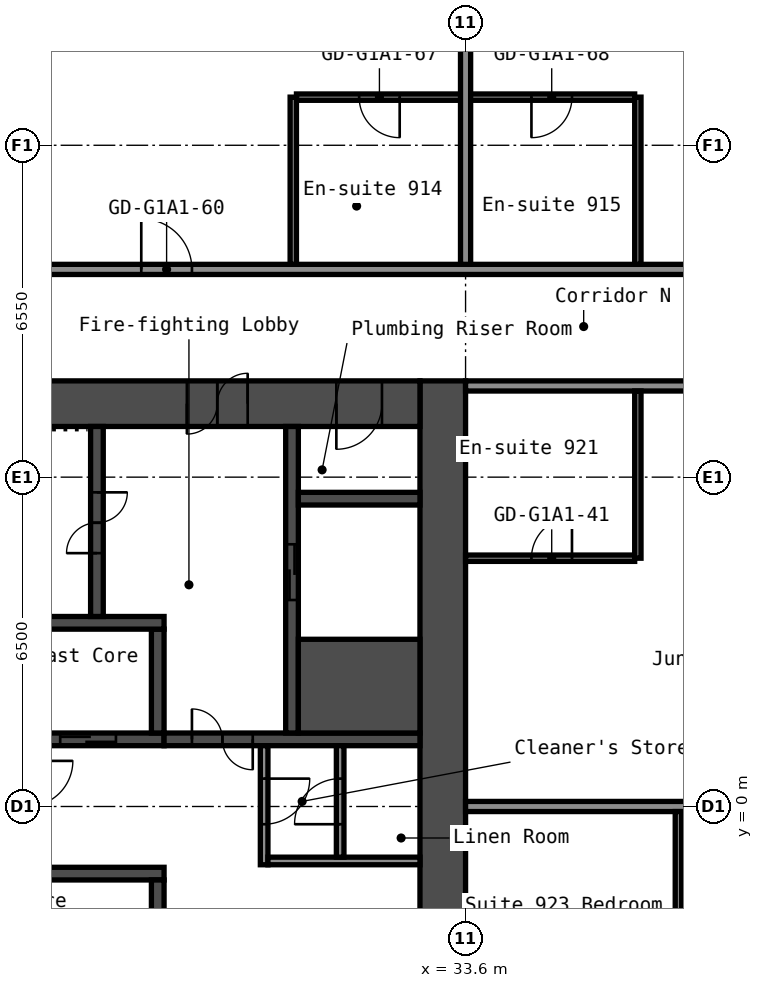
"""IFC4 building model, lengths in metres.
Left out: names, types, materials, properties, quantities, classifications, styles, units other than length and angle.
Written with IfcOpenShell. Run it as: python <this file> out.ifc"""

import sys

from ifc_helpers import new_model, si_unit, direction, frame, frame_2d, origin, place, context, subcontext, project, spatial, rectangle, extrude, element, fill, save


model = new_model("IFC4")
c1 = context("Model", 3, precision=1e-05, world=origin(), true_north=direction((0.0, 1.0)))
c2 = subcontext(c1, "Body", "Model", "MODEL_VIEW")
j1 = project(units=[si_unit("LENGTHUNIT", "METRE"), si_unit("PLANEANGLEUNIT", "RADIAN")], contexts=[c1])
p1 = place(None, origin())
s1 = spatial("IfcSite", under=j1, at=p1, CompositionType="ELEMENT")
p2 = place(p1, origin())
s2 = spatial("IfcBuilding", under=s1, at=p2, CompositionType="ELEMENT")
p3 = place(p2, frame((0.0, 0.0, 35.8)))
s3 = spatial("IfcBuildingStorey", under=s2, at=p3, CompositionType="ELEMENT", Elevation=35.8)
p4 = place(p3, frame((33.15, -8.4, 0.0), z_axis=(0.0, 0.0, 1.0), x_axis=(0.0, 1.0, 0.0)))
e1 = element("IfcWall", 1, at=p4, inside=s3, PredefinedType="SHEAR", context=c2, shape_type="SweptSolid", body=[
    extrude(rectangle(XDim=16.8, YDim=0.9, at=frame_2d((8.4, 0.0))), origin(), (0.0, 0.0, 1.0), 2.8),
])
p5 = place(p3, frame((17.7, 7.95, 0.0), z_axis=(0.0, 0.0, 1.0), x_axis=(1.0, 0.0, 0.0)))
e2 = element("IfcWall", 2, at=p5, inside=s3, PredefinedType="SHEAR", context=c2, shape_type="SweptSolid", body=[
    extrude(rectangle(XDim=15.0, YDim=0.9, at=frame_2d((7.5, 0.0))), origin(), (0.0, 0.0, 1.0), 2.8),
])
p6 = place(p5, frame((10.4, 0.0, 0.0)))
e3 = element("IfcOpeningElement", 3, at=p6, cuts=e2, PredefinedType="OPENING", context=c2, shape_type="SweptSolid", body=[
    extrude(rectangle(XDim=1.2, YDim=2.1, at=frame_2d((0.6, 1.05))), frame((0.0, 0.46, 0.0), z_axis=(0.0, -1.0, 0.0), x_axis=(1.0, 0.0, 0.0)), (0.0, 0.0, 1.0), 0.92),
])
p7 = place(p5, frame((13.35, 0.0, 0.0)))
e4 = element("IfcOpeningElement", 4, at=p7, cuts=e2, PredefinedType="OPENING", context=c2, shape_type="SweptSolid", body=[
    extrude(rectangle(XDim=0.9, YDim=2.1, at=frame_2d((0.45, 1.05))), frame((0.0, 0.46, 0.0), z_axis=(0.0, -1.0, 0.0), x_axis=(1.0, 0.0, 0.0)), (0.0, 0.0, 1.0), 0.92),
])
p8 = place(p3, frame((20.15, 1.325, 0.0), z_axis=(0.0, 0.0, 1.0), x_axis=(1.0, 0.0, 0.0)))
e5 = element("IfcWall", 5, at=p8, inside=s3, PredefinedType="SHEAR", context=c2, shape_type="SweptSolid", body=[
    extrude(rectangle(XDim=7.5, YDim=0.25, at=frame_2d((3.75, 0.0))), origin(), (0.0, 0.0, 1.0), 2.8),
])
p9 = place(p8, frame((0.65, 0.0, 0.0)))
e6 = element("IfcOpeningElement", 6, at=p9, cuts=e5, PredefinedType="OPENING", context=c2, shape_type="SweptSolid", body=[
    extrude(rectangle(XDim=1.1, YDim=2.1, at=frame_2d((0.55, 1.05))), frame((0.0, 0.135, 0.0), z_axis=(0.0, -1.0, 0.0), x_axis=(1.0, 0.0, 0.0)), (0.0, 0.0, 1.0), 0.27),
])
p10 = place(p8, frame((3.05, 0.0, 0.0)))
e7 = element("IfcOpeningElement", 7, at=p10, cuts=e5, PredefinedType="OPENING", context=c2, shape_type="SweptSolid", body=[
    extrude(rectangle(XDim=1.1, YDim=2.1, at=frame_2d((0.55, 1.05))), frame((0.0, 0.135, 0.0), z_axis=(0.0, -1.0, 0.0), x_axis=(1.0, 0.0, 0.0)), (0.0, 0.0, 1.0), 0.27),
])
p11 = place(p8, frame((5.45, 0.0, 0.0)))
e8 = element("IfcOpeningElement", 8, at=p11, cuts=e5, PredefinedType="OPENING", context=c2, shape_type="SweptSolid", body=[
    extrude(rectangle(XDim=1.1, YDim=2.1, at=frame_2d((0.55, 1.05))), frame((0.0, 0.135, 0.0), z_axis=(0.0, -1.0, 0.0), x_axis=(1.0, 0.0, 0.0)), (0.0, 0.0, 1.0), 0.27),
])
p12 = place(p3, frame((27.525, 1.45, 0.0), z_axis=(0.0, 0.0, 1.0), x_axis=(0.0, 1.0, 0.0)))
e9 = element("IfcWall", 9, at=p12, inside=s3, PredefinedType="SHEAR", context=c2, shape_type="SweptSolid", body=[
    extrude(rectangle(XDim=2.05, YDim=0.25, at=frame_2d((1.025, 0.0))), origin(), (0.0, 0.0, 1.0), 2.8),
])
p13 = place(p3, frame((20.15, 3.625, 0.0), z_axis=(0.0, 0.0, 1.0), x_axis=(1.0, 0.0, 0.0)))
e10 = element("IfcWall", 10, at=p13, inside=s3, PredefinedType="SHEAR", context=c2, shape_type="SweptSolid", body=[
    extrude(rectangle(XDim=7.5, YDim=0.25, at=frame_2d((3.75, 0.0))), origin(), (0.0, 0.0, 1.0), 2.8),
])
p14 = place(p3, frame((26.325, 3.75, 0.0), z_axis=(0.0, 0.0, 1.0), x_axis=(0.0, 1.0, 0.0)))
e11 = element("IfcWall", 11, at=p14, inside=s3, PredefinedType="SHEAR", context=c2, shape_type="SweptSolid", body=[
    extrude(rectangle(XDim=3.75, YDim=0.25, at=frame_2d((1.875, 0.0))), origin(), (0.0, 0.0, 1.0), 2.8),
])
p15 = place(p14, frame((1.25, 0.0, 0.0)))
e12 = element("IfcOpeningElement", 12, at=p15, cuts=e11, PredefinedType="OPENING", context=c2, shape_type="SweptSolid", body=[
    extrude(rectangle(XDim=1.2, YDim=2.1, at=frame_2d((0.6, 1.05))), frame((0.0, 0.135, 0.0), z_axis=(0.0, -1.0, 0.0), x_axis=(1.0, 0.0, 0.0)), (0.0, 0.0, 1.0), 0.27),
])
p16 = place(p3, frame((27.65, 1.325, 0.0), z_axis=(0.0, 0.0, 1.0), x_axis=(1.0, 0.0, 0.0)))
e13 = element("IfcWall", 13, at=p16, inside=s3, PredefinedType="SHEAR", context=c2, shape_type="SweptSolid", body=[
    extrude(rectangle(XDim=5.05, YDim=0.25, at=frame_2d((2.525, 0.0))), origin(), (0.0, 0.0, 1.0), 2.8),
])
p17 = place(p16, frame((0.55, 0.0, 0.0)))
e14 = element("IfcOpeningElement", 14, at=p17, cuts=e13, PredefinedType="OPENING", context=c2, shape_type="SweptSolid", body=[
    extrude(rectangle(XDim=1.2, YDim=2.1, at=frame_2d((0.6, 1.05))), frame((0.0, 0.135, 0.0), z_axis=(0.0, -1.0, 0.0), x_axis=(1.0, 0.0, 0.0)), (0.0, 0.0, 1.0), 0.27),
])
p18 = place(p3, frame((30.175, 1.45, 0.0), z_axis=(0.0, 0.0, 1.0), x_axis=(0.0, 1.0, 0.0)))
e15 = element("IfcWall", 15, at=p18, inside=s3, PredefinedType="SHEAR", context=c2, shape_type="SweptSolid", body=[
    extrude(rectangle(XDim=6.05, YDim=0.25, at=frame_2d((3.025, 0.0))), origin(), (0.0, 0.0, 1.0), 2.8),
])
p19 = place(p18, frame((2.625, 0.0, 0.0)))
e16 = element("IfcOpeningElement", 16, at=p19, cuts=e15, PredefinedType="OPENING", context=c2, shape_type="SweptSolid", body=[
    extrude(rectangle(XDim=1.1, YDim=2.1, at=frame_2d((0.55, 1.05))), frame((0.0, 0.135, 0.0), z_axis=(0.0, -1.0, 0.0), x_axis=(1.0, 0.0, 0.0)), (0.0, 0.0, 1.0), 0.27),
])
p20 = place(p3, frame((30.3, 2.375, 0.0), z_axis=(0.0, 0.0, 1.0), x_axis=(1.0, 0.0, 0.0)))
e17 = element("IfcWall", 17, at=p20, inside=s3, PredefinedType="SHEAR", context=c2, shape_type="SweptSolid", body=[
    extrude(rectangle(XDim=2.4, YDim=1.85, at=frame_2d((1.2, 0.0))), origin(), (0.0, 0.0, 1.0), 2.8),
])
p21 = place(p3, frame((30.3, 6.075, 0.0), z_axis=(0.0, 0.0, 1.0), x_axis=(1.0, 0.0, 0.0)))
e18 = element("IfcWall", 18, at=p21, inside=s3, PredefinedType="SHEAR", context=c2, shape_type="SweptSolid", body=[
    extrude(rectangle(XDim=2.4, YDim=0.25, at=frame_2d((1.2, 0.0))), origin(), (0.0, 0.0, 1.0), 2.8),
])
p22 = place(p3, frame((20.15, -1.325, 0.0), z_axis=(0.0, 0.0, 1.0), x_axis=(1.0, 0.0, 0.0)))
e19 = element("IfcWall", 19, at=p22, inside=s3, PredefinedType="SHEAR", context=c2, shape_type="SweptSolid", body=[
    extrude(rectangle(XDim=7.5, YDim=0.25, at=frame_2d((3.75, 0.0))), origin(), (0.0, 0.0, 1.0), 2.8),
])
p23 = place(p3, frame((27.525, -3.5, 0.0), z_axis=(0.0, 0.0, 1.0), x_axis=(0.0, 1.0, 0.0)))
e20 = element("IfcWall", 20, at=p23, inside=s3, PredefinedType="SHEAR", context=c2, shape_type="SweptSolid", body=[
    extrude(rectangle(XDim=2.05, YDim=0.25, at=frame_2d((1.025, 0.0))), origin(), (0.0, 0.0, 1.0), 2.8),
])
p24 = place(p3, frame((29.625, -1.15, 0.0), z_axis=(0.0, 0.0, 1.0), x_axis=(0.0, 1.0, 0.0)))
e21 = element("IfcWall", 21, at=p24, inside=s3, PredefinedType="PARTITIONING", context=c2, shape_type="SweptSolid", body=[
    extrude(rectangle(XDim=2.35, YDim=0.15, at=frame_2d((1.175, 0.0))), origin(), (0.0, 0.0, 1.0), 2.8),
])
p25 = place(p24, frame((0.8, 0.0, 0.0)))
e22 = element("IfcOpeningElement", 22, at=p25, cuts=e21, PredefinedType="OPENING", context=c2, shape_type="SweptSolid", body=[
    extrude(rectangle(XDim=0.9, YDim=2.1, at=frame_2d((0.45, 1.05))), frame((0.0, 0.085, 0.0), z_axis=(0.0, -1.0, 0.0), x_axis=(1.0, 0.0, 0.0)), (0.0, 0.0, 1.0), 0.17),
])
p26 = place(p3, frame((29.7, -1.075, 0.0), z_axis=(0.0, 0.0, 1.0), x_axis=(1.0, 0.0, 0.0)))
e23 = element("IfcWall", 23, at=p26, inside=s3, PredefinedType="PARTITIONING", context=c2, shape_type="SweptSolid", body=[
    extrude(rectangle(XDim=3.0, YDim=0.15, at=frame_2d((1.5, 0.0))), origin(), (0.0, 0.0, 1.0), 2.8),
])
p27 = place(p3, frame((31.125, -1.0, 0.0), z_axis=(0.0, 0.0, 1.0), x_axis=(0.0, 1.0, 0.0)))
e24 = element("IfcWall", 24, at=p27, inside=s3, PredefinedType="PARTITIONING", context=c2, shape_type="SweptSolid", body=[
    extrude(rectangle(XDim=2.2, YDim=0.15, at=frame_2d((1.1, 0.0))), origin(), (0.0, 0.0, 1.0), 2.8),
])
p28 = place(p27, frame((0.65, 0.0, 0.0)))
e25 = element("IfcOpeningElement", 25, at=p28, cuts=e24, PredefinedType="OPENING", context=c2, shape_type="SweptSolid", body=[
    extrude(rectangle(XDim=0.9, YDim=2.1, at=frame_2d((0.45, 1.05))), frame((0.0, 0.085, 0.0), z_axis=(0.0, -1.0, 0.0), x_axis=(1.0, 0.0, 0.0)), (0.0, 0.0, 1.0), 0.17),
])
p29 = place(p3, frame((33.6, 0.0, 0.0), z_axis=(0.0, 0.0, 1.0), x_axis=(1.0, 0.0, 0.0)))
e26 = element("IfcWall", 26, at=p29, inside=s3, PredefinedType="PARTITIONING", context=c2, shape_type="SweptSolid", body=[
    extrude(rectangle(XDim=14.9, YDim=0.2, at=frame_2d((7.45, 0.0))), origin(), (0.0, 0.0, 1.0), 2.8),
])
p30 = place(p3, frame((33.6, 4.9, 0.0), z_axis=(0.0, 0.0, 1.0), x_axis=(1.0, 0.0, 0.0)))
e27 = element("IfcWall", 27, at=p30, inside=s3, PredefinedType="PARTITIONING", context=c2, shape_type="SweptSolid", body=[
    extrude(rectangle(XDim=3.337, YDim=0.125, at=frame_2d((1.669, 0.0))), origin(), (0.0, 0.0, 1.0), 2.8),
])
p31 = place(p30, frame((1.3, 0.0, 0.0)))
e28 = element("IfcOpeningElement", 28, at=p31, cuts=e27, PredefinedType="OPENING", context=c2, shape_type="SweptSolid", body=[
    extrude(rectangle(XDim=0.8, YDim=2.1, at=frame_2d((0.4, 1.05))), frame((0.0, 0.073, 0.0), z_axis=(0.0, -1.0, 0.0), x_axis=(1.0, 0.0, 0.0)), (0.0, 0.0, 1.0), 0.145),
])
p32 = place(p3, frame((33.6, 8.3, 0.0), z_axis=(0.0, 0.0, 1.0), x_axis=(1.0, 0.0, 0.0)))
e29 = element("IfcWall", 29, at=p32, inside=s3, PredefinedType="PARTITIONING", context=c2, shape_type="SweptSolid", body=[
    extrude(rectangle(XDim=15.0, YDim=0.2, at=frame_2d((7.5, 0.0))), origin(), (0.0, 0.0, 1.0), 2.8),
])
p33 = place(p32, frame((5.4, 0.0, 0.0)))
e30 = element("IfcOpeningElement", 30, at=p33, cuts=e29, PredefinedType="OPENING", context=c2, shape_type="SweptSolid", body=[
    extrude(rectangle(XDim=1.0, YDim=2.1, at=frame_2d((0.5, 1.05))), frame((0.0, 0.11, 0.0), z_axis=(0.0, -1.0, 0.0), x_axis=(1.0, 0.0, 0.0)), (0.0, 0.0, 1.0), 0.22),
])
p34 = place(p32, frame((12.9, 0.0, 0.0)))
e31 = element("IfcOpeningElement", 31, at=p34, cuts=e29, PredefinedType="OPENING", context=c2, shape_type="SweptSolid", body=[
    extrude(rectangle(XDim=1.0, YDim=2.1, at=frame_2d((0.5, 1.05))), frame((0.0, 0.11, 0.0), z_axis=(0.0, -1.0, 0.0), x_axis=(1.0, 0.0, 0.0)), (0.0, 0.0, 1.0), 0.22),
])
p35 = place(p3, frame((16.8, 10.6, 0.0), z_axis=(0.0, 0.0, 1.0), x_axis=(1.0, 0.0, 0.0)))
e32 = element("IfcWall", 32, at=p35, inside=s3, PredefinedType="PARTITIONING", context=c2, shape_type="SweptSolid", body=[
    extrude(rectangle(XDim=34.3, YDim=0.2, at=frame_2d((17.15, 0.0))), origin(), (0.0, 0.0, 1.0), 2.8),
])
p36 = place(p35, frame((5.4, 0.0, 0.0)))
e33 = element("IfcOpeningElement", 33, at=p36, cuts=e32, PredefinedType="OPENING", context=c2, shape_type="SweptSolid", body=[
    extrude(rectangle(XDim=1.0, YDim=2.1, at=frame_2d((0.5, 1.05))), frame((0.0, 0.11, 0.0), z_axis=(0.0, -1.0, 0.0), x_axis=(1.0, 0.0, 0.0)), (0.0, 0.0, 1.0), 0.22),
])
p37 = place(p35, frame((10.4, 0.0, 0.0)))
e34 = element("IfcOpeningElement", 34, at=p37, cuts=e32, PredefinedType="OPENING", context=c2, shape_type="SweptSolid", body=[
    extrude(rectangle(XDim=1.0, YDim=2.1, at=frame_2d((0.5, 1.05))), frame((0.0, 0.11, 0.0), z_axis=(0.0, -1.0, 0.0), x_axis=(1.0, 0.0, 0.0)), (0.0, 0.0, 1.0), 0.22),
])
p38 = place(p35, frame((22.2, 0.0, 0.0)))
e35 = element("IfcOpeningElement", 35, at=p38, cuts=e32, PredefinedType="OPENING", context=c2, shape_type="SweptSolid", body=[
    extrude(rectangle(XDim=1.0, YDim=2.1, at=frame_2d((0.5, 1.05))), frame((0.0, 0.11, 0.0), z_axis=(0.0, -1.0, 0.0), x_axis=(1.0, 0.0, 0.0)), (0.0, 0.0, 1.0), 0.22),
])
p39 = place(p35, frame((27.4, 0.0, 0.0)))
e36 = element("IfcOpeningElement", 36, at=p39, cuts=e32, PredefinedType="OPENING", context=c2, shape_type="SweptSolid", body=[
    extrude(rectangle(XDim=1.0, YDim=2.1, at=frame_2d((0.5, 1.05))), frame((0.0, 0.11, 0.0), z_axis=(0.0, -1.0, 0.0), x_axis=(1.0, 0.0, 0.0)), (0.0, 0.0, 1.0), 0.22),
])
p40 = place(p3, frame((30.262, 14.0, 0.0), z_axis=(0.0, 0.0, 1.0), x_axis=(1.0, 0.0, 0.0)))
e37 = element("IfcWall", 37, at=p40, inside=s3, PredefinedType="PARTITIONING", context=c2, shape_type="SweptSolid", body=[
    extrude(rectangle(XDim=6.675, YDim=0.125, at=frame_2d((3.337, 0.0))), origin(), (0.0, 0.0, 1.0), 2.8),
])
p41 = place(p40, frame((1.238, 0.0, 0.0)))
e38 = element("IfcOpeningElement", 38, at=p41, cuts=e37, PredefinedType="OPENING", context=c2, shape_type="SweptSolid", body=[
    extrude(rectangle(XDim=0.8, YDim=2.1, at=frame_2d((0.4, 1.05))), frame((0.0, 0.073, 0.0), z_axis=(0.0, -1.0, 0.0), x_axis=(1.0, 0.0, 0.0)), (0.0, 0.0, 1.0), 0.145),
])
p42 = place(p40, frame((4.637, 0.0, 0.0)))
e39 = element("IfcOpeningElement", 39, at=p42, cuts=e37, PredefinedType="OPENING", context=c2, shape_type="SweptSolid", body=[
    extrude(rectangle(XDim=0.8, YDim=2.1, at=frame_2d((0.4, 1.05))), frame((0.0, 0.073, 0.0), z_axis=(0.0, -1.0, 0.0), x_axis=(1.0, 0.0, 0.0)), (0.0, 0.0, 1.0), 0.145),
])
p43 = place(p3, frame((30.2, 10.7, 0.0), z_axis=(0.0, 0.0, 1.0), x_axis=(0.0, 1.0, 0.0)))
e40 = element("IfcWall", 40, at=p43, inside=s3, PredefinedType="PARTITIONING", context=c2, shape_type="SweptSolid", body=[
    extrude(rectangle(XDim=3.3, YDim=0.125, at=frame_2d((1.65, 0.0))), origin(), (0.0, 0.0, 1.0), 2.8),
])
p44 = place(p3, frame((33.6, 10.7, 0.0), z_axis=(0.0, 0.0, 1.0), x_axis=(0.0, 1.0, 0.0)))
e41 = element("IfcWall", 41, at=p44, inside=s3, PredefinedType="PARTITIONING", context=c2, shape_type="SweptSolid", body=[
    extrude(rectangle(XDim=9.6, YDim=0.2, at=frame_2d((4.8, 0.0))), origin(), (0.0, 0.0, 1.0), 2.8),
])
for number, where, z_axis, x_axis in (
    (42, (37.0, 4.9, 0.0), (0.0, 0.0, 1.0), (0.0, 1.0, 0.0)),
    (43, (37.0, 10.7, 0.0), (0.0, 0.0, 1.0), (0.0, 1.0, 0.0)),
):
    element("IfcWall", number, at=place(p3, frame(where, z_axis=z_axis, x_axis=x_axis)), inside=s3, PredefinedType="PARTITIONING", context=c2, shape_type="SweptSolid", body=[
        extrude(rectangle(XDim=3.3, YDim=0.125, at=frame_2d((1.65, 0.0))), origin(), (0.0, 0.0, 1.0), 2.8),
    ])
p45 = place(p3, frame((37.8, -8.2, 0.0), z_axis=(0.0, 0.0, 1.0), x_axis=(0.0, 1.0, 0.0)))
e44 = element("IfcWall", 44, at=p45, inside=s3, PredefinedType="PARTITIONING", context=c2, shape_type="SweptSolid", body=[
    extrude(rectangle(XDim=8.1, YDim=0.125, at=frame_2d((4.05, 0.0))), origin(), (0.0, 0.0, 1.0), 2.8),
])
p46 = place(p45, frame((4.05, 0.0, 0.0)))
e45 = element("IfcOpeningElement", 45, at=p46, cuts=e44, PredefinedType="OPENING", context=c2, shape_type="SweptSolid", body=[
    extrude(rectangle(XDim=0.9, YDim=2.1, at=frame_2d((0.45, 1.05))), frame((0.0, 0.073, 0.0), z_axis=(0.0, -1.0, 0.0), x_axis=(1.0, 0.0, 0.0)), (0.0, 0.0, 1.0), 0.145),
])
p47 = place(p6, origin())
e46 = element("IfcDoor", 46, at=p47, inside=s3, OperationType="DOUBLE_DOOR_SINGLE_SWING", PredefinedType="DOOR", context=c2, shape_type="SweptSolid", body=[
    extrude(rectangle(XDim=1.2, YDim=2.1, at=frame_2d((0.6, 1.05))), frame((0.0, 0.025, 0.0), z_axis=(0.0, -1.0, 0.0), x_axis=(1.0, 0.0, 0.0)), (0.0, 0.0, 1.0), 0.05),
])
fill(e3, e46)
p48 = place(p7, origin())
e47 = element("IfcDoor", 47, at=p48, inside=s3, OperationType="SINGLE_SWING_LEFT", PredefinedType="DOOR", context=c2, shape_type="SweptSolid", body=[
    extrude(rectangle(XDim=0.9, YDim=2.1, at=frame_2d((0.45, 1.05))), frame((0.0, 0.025, 0.0), z_axis=(0.0, -1.0, 0.0), x_axis=(1.0, 0.0, 0.0)), (0.0, 0.0, 1.0), 0.05),
])
fill(e4, e47)
p49 = place(p15, origin())
e48 = element("IfcDoor", 48, at=p49, inside=s3, OperationType="DOUBLE_DOOR_SINGLE_SWING", PredefinedType="DOOR", context=c2, shape_type="SweptSolid", body=[
    extrude(rectangle(XDim=1.2, YDim=2.1, at=frame_2d((0.6, 1.05))), frame((0.0, 0.025, 0.0), z_axis=(0.0, -1.0, 0.0), x_axis=(1.0, 0.0, 0.0)), (0.0, 0.0, 1.0), 0.05),
])
fill(e12, e48)
p50 = place(p17, origin())
e49 = element("IfcDoor", 49, at=p50, inside=s3, OperationType="DOUBLE_DOOR_SINGLE_SWING", PredefinedType="DOOR", context=c2, shape_type="SweptSolid", body=[
    extrude(rectangle(XDim=1.2, YDim=2.1, at=frame_2d((0.6, 1.05))), frame((0.0, 0.025, 0.0), z_axis=(0.0, -1.0, 0.0), x_axis=(1.0, 0.0, 0.0)), (0.0, 0.0, 1.0), 0.05),
])
fill(e14, e49)
p51 = place(p25, origin())
e50 = element("IfcDoor", 50, at=p51, inside=s3, OperationType="SINGLE_SWING_RIGHT", PredefinedType="DOOR", context=c2, shape_type="SweptSolid", body=[
    extrude(rectangle(XDim=0.9, YDim=2.1, at=frame_2d((0.45, 1.05))), frame((0.0, 0.025, 0.0), z_axis=(0.0, -1.0, 0.0), x_axis=(1.0, 0.0, 0.0)), (0.0, 0.0, 1.0), 0.05),
])
fill(e22, e50)
p52 = place(p28, origin())
e51 = element("IfcDoor", 51, at=p52, inside=s3, OperationType="SINGLE_SWING_RIGHT", PredefinedType="DOOR", context=c2, shape_type="SweptSolid", body=[
    extrude(rectangle(XDim=0.9, YDim=2.1, at=frame_2d((0.45, 1.05))), frame((0.0, 0.025, 0.0), z_axis=(0.0, -1.0, 0.0), x_axis=(1.0, 0.0, 0.0)), (0.0, 0.0, 1.0), 0.05),
])
fill(e25, e51)
p53 = place(p11, origin())
e52 = element("IfcDoor", 52, at=p53, inside=s3, OperationType="DOUBLE_DOOR_SLIDING", PredefinedType="DOOR", context=c2, shape_type="SweptSolid", body=[
    extrude(rectangle(XDim=1.1, YDim=2.1, at=frame_2d((0.55, 1.05))), frame((0.0, 0.025, 0.0), z_axis=(0.0, -1.0, 0.0), x_axis=(1.0, 0.0, 0.0)), (0.0, 0.0, 1.0), 0.05),
])
fill(e8, e52)
p54 = place(p19, origin())
e53 = element("IfcDoor", 53, at=p54, inside=s3, OperationType="DOUBLE_DOOR_SLIDING", PredefinedType="DOOR", context=c2, shape_type="SweptSolid", body=[
    extrude(rectangle(XDim=1.1, YDim=2.1, at=frame_2d((0.55, 1.05))), frame((0.0, 0.025, 0.0), z_axis=(0.0, -1.0, 0.0), x_axis=(1.0, 0.0, 0.0)), (0.0, 0.0, 1.0), 0.05),
])
fill(e16, e53)
p55 = place(p31, origin())
e54 = element("IfcDoor", 54, at=p55, inside=s3, OperationType="SINGLE_SWING_LEFT", PredefinedType="DOOR", context=c2, shape_type="SweptSolid", body=[
    extrude(rectangle(XDim=0.8, YDim=2.1, at=frame_2d((0.4, 1.05))), frame((0.0, 0.025, 0.0), z_axis=(0.0, -1.0, 0.0), x_axis=(1.0, 0.0, 0.0)), (0.0, 0.0, 1.0), 0.05),
])
fill(e28, e54)
p56 = place(p37, origin())
e55 = element("IfcDoor", 55, at=p56, inside=s3, OperationType="SINGLE_SWING_RIGHT", PredefinedType="DOOR", context=c2, shape_type="SweptSolid", body=[
    extrude(rectangle(XDim=1.0, YDim=2.1, at=frame_2d((0.5, 1.05))), frame((0.0, 0.025, 0.0), z_axis=(0.0, -1.0, 0.0), x_axis=(1.0, 0.0, 0.0)), (0.0, 0.0, 1.0), 0.05),
])
fill(e34, e55)
p57 = place(p41, origin())
e56 = element("IfcDoor", 56, at=p57, inside=s3, OperationType="SINGLE_SWING_RIGHT", PredefinedType="DOOR", context=c2, shape_type="SweptSolid", body=[
    extrude(rectangle(XDim=0.8, YDim=2.1, at=frame_2d((0.4, 1.05))), frame((0.0, 0.025, 0.0), z_axis=(0.0, -1.0, 0.0), x_axis=(1.0, 0.0, 0.0)), (0.0, 0.0, 1.0), 0.05),
])
fill(e38, e56)
p58 = place(p42, origin())
e57 = element("IfcDoor", 57, at=p58, inside=s3, OperationType="SINGLE_SWING_LEFT", PredefinedType="DOOR", context=c2, shape_type="SweptSolid", body=[
    extrude(rectangle(XDim=0.8, YDim=2.1, at=frame_2d((0.4, 1.05))), frame((0.0, 0.025, 0.0), z_axis=(0.0, -1.0, 0.0), x_axis=(1.0, 0.0, 0.0)), (0.0, 0.0, 1.0), 0.05),
])
fill(e39, e57)
save(model, sys.argv[1])
